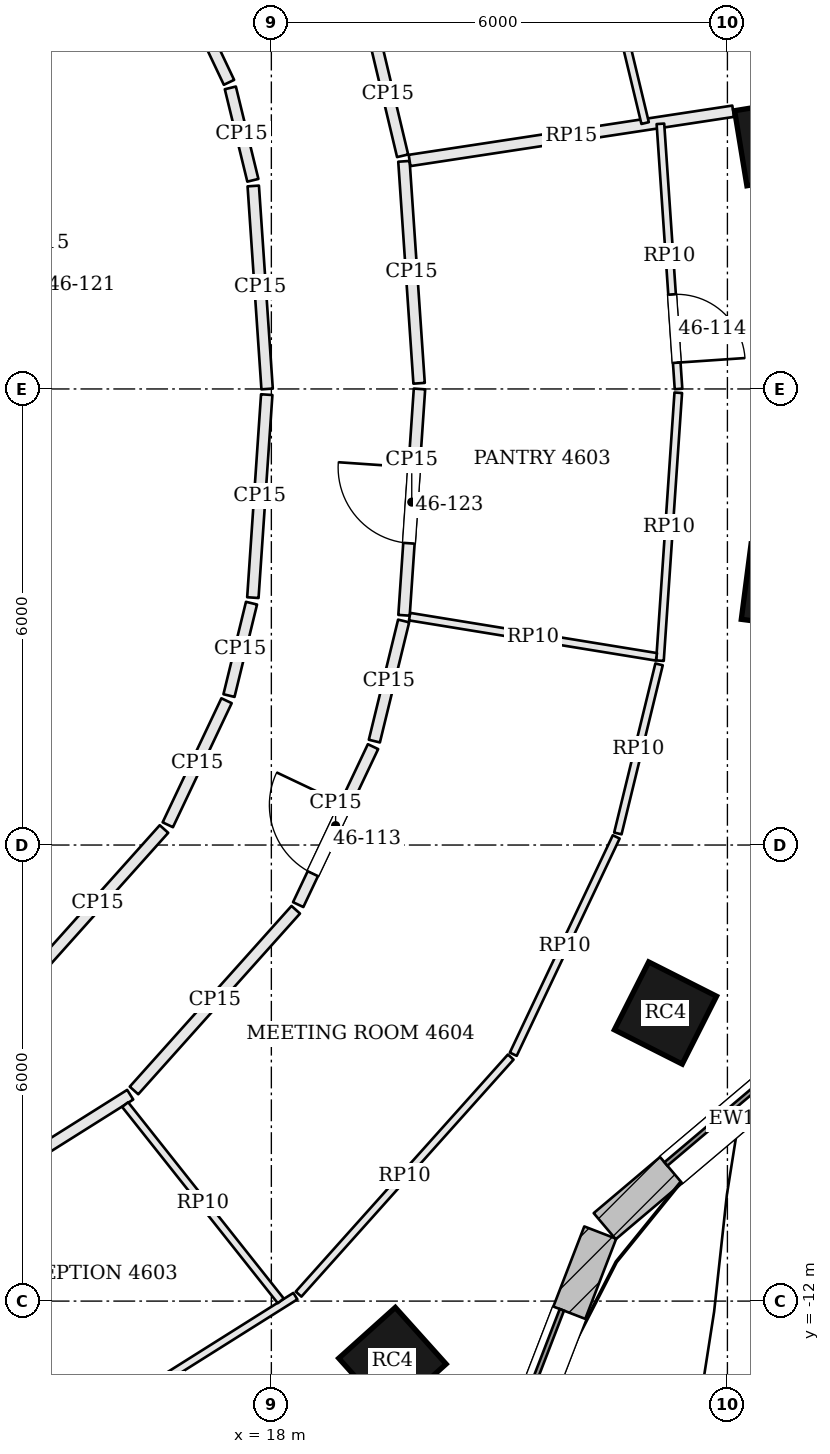
"""IFC4 building model, lengths in metres.
Left out: names, types, materials, properties, quantities, classifications, styles, units other than length and angle.
Written with IfcOpenShell. Run it as: python <this file> out.ifc"""

import sys

from ifc_helpers import new_model, si_unit, direction, frame, frame_2d, origin, origin_2d, place, context, subcontext, project, spatial, rectangle, extrude, element, fill, save


model = new_model("IFC4")
c1 = context("Model", 3, precision=1e-05, world=origin(), true_north=direction((0.0, 1.0)))
c2 = subcontext(c1, "Body", "Model", "MODEL_VIEW")
j1 = project(units=[si_unit("LENGTHUNIT", "METRE"), si_unit("PLANEANGLEUNIT", "RADIAN")], contexts=[c1])
p1 = place(None, origin())
s1 = spatial("IfcSite", under=j1, at=p1, CompositionType="ELEMENT")
p2 = place(p1, origin())
s2 = spatial("IfcBuilding", under=s1, at=p2, CompositionType="ELEMENT")
p3 = place(p2, frame((0.0, 0.0, 189.6)))
s3 = spatial("IfcBuildingStorey", under=s2, at=p3, CompositionType="ELEMENT", Elevation=189.6)
for number, where, z_axis, x_axis in (
    (1, (24.669, 3.248, 0.0), (0.0, 0.0, 1.0), (-0.162, 0.987, 0.0)),
    (2, (19.593, -12.79, 0.0), (0.0, 0.0, 1.0), (0.744, 0.668, 0.0)),
    (3, (23.185, -8.21, 0.0), (0.0, 0.0, 1.0), (0.451, 0.893, 0.0)),
    (4, (24.743, -2.599, 0.0), (0.0, 0.0, 1.0), (0.128, 0.992, 0.0)),
):
    element("IfcColumn", number, at=place(p3, frame(where, z_axis=z_axis, x_axis=x_axis)), inside=s3, PredefinedType="COLUMN", context=c2, shape_type="SweptSolid", body=[
        extrude(rectangle(XDim=1.0, YDim=1.0, at=origin_2d()), origin(), (0.0, 0.0, 1.0), 3.9),
    ])
p4 = place(p3, frame((20.757, -15.166, 0.0), z_axis=(0.0, 0.0, 1.0), x_axis=(0.360067043581, 0.932926430179, 0.0)))
e5 = element("IfcWall", 5, at=p4, inside=s3, PredefinedType="SOLIDWALL", context=c2, shape_type="SweptSolid", body=[
    extrude(rectangle(XDim=4.36, YDim=0.45, at=frame_2d((2.18, 0.0))), origin(), (0.0, 0.0, 1.0), 3.7),
])
p5 = place(p4, frame((1.13, 0.0, 0.9)))
e6 = element("IfcOpeningElement", 6, at=p5, cuts=e5, PredefinedType="OPENING", context=c2, shape_type="SweptSolid", body=[
    extrude(rectangle(XDim=2.1, YDim=2.3, at=frame_2d((1.05, 1.15))), frame((0.0, 0.235, 0.0), z_axis=(0.0, -1.0, 0.0), x_axis=(1.0, 0.0, 0.0)), (0.0, 0.0, 1.0), 0.47),
])
p6 = place(p3, frame((22.386, -11.014, 0.0), z_axis=(0.0, 0.0, 1.0), x_axis=(0.763569952162, 0.645725118108, 0.0)))
e7 = element("IfcWall", 7, at=p6, inside=s3, PredefinedType="SOLIDWALL", context=c2, shape_type="SweptSolid", body=[
    extrude(rectangle(XDim=4.386, YDim=0.45, at=frame_2d((2.193, 0.0))), origin(), (0.0, 0.0, 1.0), 3.7),
])
p7 = place(p6, frame((1.143, 0.0, 0.9)))
e8 = element("IfcOpeningElement", 8, at=p7, cuts=e7, PredefinedType="OPENING", context=c2, shape_type="SweptSolid", body=[
    extrude(rectangle(XDim=2.1, YDim=2.3, at=frame_2d((1.05, 1.15))), frame((0.0, 0.235, 0.0), z_axis=(0.0, -1.0, 0.0), x_axis=(1.0, 0.0, 0.0)), (0.0, 0.0, 1.0), 0.47),
])
p8 = place(p3, frame((13.197, -11.139, 0.0), z_axis=(0.0, 0.0, 1.0), x_axis=(0.846390903833, 0.532562144644, 0.0)))
e9 = element("IfcWall", 9, at=p8, inside=s3, PredefinedType="PARTITIONING", context=c2, shape_type="SweptSolid", body=[
    extrude(rectangle(XDim=3.481, YDim=0.15, at=frame_2d((1.741, 0.0))), origin(), (0.0, 0.0, 1.0), 3.084),
])
p9 = place(p3, frame((16.193, -9.229, 0.0), z_axis=(0.0, 0.0, 1.0), x_axis=(0.666882089048, 0.745163256815, 0.0)))
e10 = element("IfcWall", 10, at=p9, inside=s3, PredefinedType="PARTITIONING", context=c2, shape_type="SweptSolid", body=[
    extrude(rectangle(XDim=3.19, YDim=0.15, at=frame_2d((1.595, 0.0))), origin(), (0.0, 0.0, 1.0), 3.084),
])
p10 = place(p3, frame((18.353, -6.784, 0.0), z_axis=(0.0, 0.0, 1.0), x_axis=(0.428086344739, 0.903737838894, 0.0)))
e11 = element("IfcWall", 11, at=p10, inside=s3, PredefinedType="PARTITIONING", context=c2, shape_type="SweptSolid", body=[
    extrude(rectangle(XDim=2.3, YDim=0.15, at=frame_2d((1.15, 0.0))), origin(), (0.0, 0.0, 1.0), 3.084),
])
p11 = place(p10, frame((0.45, 0.0, 0.0)))
e12 = element("IfcOpeningElement", 12, at=p11, cuts=e11, PredefinedType="OPENING", context=c2, shape_type="SweptSolid", body=[
    extrude(rectangle(XDim=1.0, YDim=2.4, at=frame_2d((0.5, 1.2))), frame((0.0, 0.085, 0.0), z_axis=(0.0, -1.0, 0.0), x_axis=(1.0, 0.0, 0.0)), (0.0, 0.0, 1.0), 0.17),
])
p12 = place(p3, frame((19.355, -4.633, 0.0), z_axis=(0.0, 0.0, 1.0), x_axis=(0.236703930685, 0.971581828359, 0.0)))
e13 = element("IfcWall", 13, at=p12, inside=s3, PredefinedType="PARTITIONING", context=c2, shape_type="SweptSolid", body=[
    extrude(rectangle(XDim=1.626, YDim=0.15, at=frame_2d((0.813, 0.0))), origin(), (0.0, 0.0, 1.0), 3.084),
])
p13 = place(p3, frame((19.745, -2.978, 0.0), z_axis=(0.0, 0.0, 1.0), x_axis=(0.068142324, 0.997675610447, 0.0)))
e14 = element("IfcWall", 14, at=p13, inside=s3, PredefinedType="PARTITIONING", context=c2, shape_type="SweptSolid", body=[
    extrude(rectangle(XDim=2.984, YDim=0.15, at=frame_2d((1.492, 0.0))), origin(), (0.0, 0.0, 1.0), 3.084),
])
p14 = place(p13, frame((0.95, 0.0, 0.0)))
e15 = element("IfcOpeningElement", 15, at=p14, cuts=e14, PredefinedType="OPENING", context=c2, shape_type="SweptSolid", body=[
    extrude(rectangle(XDim=1.0, YDim=2.1, at=frame_2d((0.5, 1.05))), frame((0.0, 0.085, 0.0), z_axis=(0.0, -1.0, 0.0), x_axis=(1.0, 0.0, 0.0)), (0.0, 0.0, 1.0), 0.17),
])
p15 = place(p3, frame((19.944, 0.075, 0.0), z_axis=(0.0, 0.0, 1.0), x_axis=(-0.068069178311, 0.997680603682, 0.0)))
e16 = element("IfcWall", 16, at=p15, inside=s3, PredefinedType="PARTITIONING", context=c2, shape_type="SweptSolid", body=[
    extrude(rectangle(XDim=2.927, YDim=0.15, at=frame_2d((1.463, 0.0))), origin(), (0.0, 0.0, 1.0), 3.084),
])
p16 = place(p3, frame((24.076, 3.654, 0.0), z_axis=(0.0, 0.0, 1.0), x_axis=(-0.988615537638, -0.150463679143, 0.0)))
e17 = element("IfcWall", 17, at=p16, inside=s3, PredefinedType="PARTITIONING", context=c2, shape_type="SweptSolid", body=[
    extrude(rectangle(XDim=4.306, YDim=0.15, at=frame_2d((2.153, 0.0))), origin(), (0.0, 0.0, 1.0), 3.184),
])
p17 = place(p3, frame((19.727, 3.068, 0.0), z_axis=(0.0, 0.0, 1.0), x_axis=(-0.231293770986, 0.972883955826, 0.0)))
e18 = element("IfcWall", 18, at=p17, inside=s3, PredefinedType="PARTITIONING", context=c2, shape_type="SweptSolid", body=[
    extrude(rectangle(XDim=1.684, YDim=0.15, at=frame_2d((0.842, 0.0))), origin(), (0.0, 0.0, 1.0), 3.084),
])
p18 = place(p3, frame((16.652, 5.702, 0.0), z_axis=(0.0, 0.0, 1.0), x_axis=(0.428126129773, -0.903718992279, 0.0)))
e19 = element("IfcWall", 19, at=p18, inside=s3, PredefinedType="PARTITIONING", context=c2, shape_type="SweptSolid", body=[
    extrude(rectangle(XDim=1.846, YDim=0.15, at=frame_2d((0.923, 0.0))), origin(), (0.0, 0.0, 1.0), 3.084),
])
p19 = place(p3, frame((17.46, 3.961, 0.0), z_axis=(0.0, 0.0, 1.0), x_axis=(0.236655249498, -0.971593687137, 0.0)))
e20 = element("IfcWall", 20, at=p19, inside=s3, PredefinedType="PARTITIONING", context=c2, shape_type="SweptSolid", body=[
    extrude(rectangle(XDim=1.251, YDim=0.15, at=frame_2d((0.626, 0.0))), origin(), (0.0, 0.0, 1.0), 3.084),
])
p20 = place(p3, frame((17.762, 2.67, 0.0), z_axis=(0.0, 0.0, 1.0), x_axis=(0.068135311644, -0.997676089373, 0.0)))
e21 = element("IfcWall", 21, at=p20, inside=s3, PredefinedType="PARTITIONING", context=c2, shape_type="SweptSolid", body=[
    extrude(rectangle(XDim=2.677, YDim=0.15, at=frame_2d((1.338, 0.0))), origin(), (0.0, 0.0, 1.0), 3.084),
])
p21 = place(p3, frame((17.939, -0.075, 0.0), z_axis=(0.0, 0.0, 1.0), x_axis=(-0.068226099283, -0.99766988497, 0.0)))
e22 = element("IfcWall", 22, at=p21, inside=s3, PredefinedType="PARTITIONING", context=c2, shape_type="SweptSolid", body=[
    extrude(rectangle(XDim=2.677, YDim=0.15, at=frame_2d((1.338, 0.0))), origin(), (0.0, 0.0, 1.0), 3.084),
])
p22 = place(p3, frame((17.739, -2.818, 0.0), z_axis=(0.0, 0.0, 1.0), x_axis=(-0.236884307907, -0.971537865792, 0.0)))
e23 = element("IfcWall", 23, at=p22, inside=s3, PredefinedType="PARTITIONING", context=c2, shape_type="SweptSolid", body=[
    extrude(rectangle(XDim=1.251, YDim=0.15, at=frame_2d((0.625, 0.0))), origin(), (0.0, 0.0, 1.0), 3.084),
])
p23 = place(p3, frame((17.41, -4.102, 0.0), z_axis=(0.0, 0.0, 1.0), x_axis=(-0.428074720318, -0.903743345107, 0.0)))
e24 = element("IfcWall", 24, at=p23, inside=s3, PredefinedType="PARTITIONING", context=c2, shape_type="SweptSolid", body=[
    extrude(rectangle(XDim=1.806, YDim=0.15, at=frame_2d((0.903, 0.0))), origin(), (0.0, 0.0, 1.0), 3.084),
])
p24 = place(p3, frame((16.587, -5.789, 0.0), z_axis=(0.0, 0.0, 1.0), x_axis=(-0.666887460656, -0.745158449472, 0.0)))
e25 = element("IfcWall", 25, at=p24, inside=s3, PredefinedType="PARTITIONING", context=c2, shape_type="SweptSolid", body=[
    extrude(rectangle(XDim=2.62, YDim=0.15, at=frame_2d((1.31, 0.0))), origin(), (0.0, 0.0, 1.0), 3.084),
])
p25 = place(p3, frame((23.118, 3.488, 0.0), z_axis=(0.0, 0.0, 1.0), x_axis=(0.068155004578, -0.997674744268, 0.0)))
e26 = element("IfcWall", 26, at=p25, inside=s3, PredefinedType="PARTITIONING", context=c2, shape_type="SweptSolid", body=[
    extrude(rectangle(XDim=3.496, YDim=0.1, at=frame_2d((1.748, 0.0))), origin(), (0.0, 0.0, 1.0), 3.084),
])
p26 = place(p25, frame((2.25, 0.0, 0.0)))
e27 = element("IfcOpeningElement", 27, at=p26, cuts=e26, PredefinedType="OPENING", context=c2, shape_type="SweptSolid", body=[
    extrude(rectangle(XDim=0.9, YDim=2.1, at=frame_2d((0.45, 1.05))), frame((0.0, 0.06, 0.0), z_axis=(0.0, -1.0, 0.0), x_axis=(1.0, 0.0, 0.0)), (0.0, 0.0, 1.0), 0.12),
])
p27 = place(p3, frame((23.354, -0.05, 0.0), z_axis=(0.0, 0.0, 1.0), x_axis=(-0.06820679361, -0.99767120501, 0.0)))
e28 = element("IfcWall", 28, at=p27, inside=s3, PredefinedType="PARTITIONING", context=c2, shape_type="SweptSolid", body=[
    extrude(rectangle(XDim=3.533, YDim=0.1, at=frame_2d((1.767, 0.0))), origin(), (0.0, 0.0, 1.0), 3.084),
])
p28 = place(p3, frame((23.101, -3.623, 0.0), z_axis=(0.0, 0.0, 1.0), x_axis=(-0.236811358433, -0.971555649727, 0.0)))
e29 = element("IfcWall", 29, at=p28, inside=s3, PredefinedType="PARTITIONING", context=c2, shape_type="SweptSolid", body=[
    extrude(rectangle(XDim=2.29, YDim=0.1, at=frame_2d((1.145, 0.0))), origin(), (0.0, 0.0, 1.0), 3.084),
])
p29 = place(p3, frame((22.537, -5.893, 0.0), z_axis=(0.0, 0.0, 1.0), x_axis=(-0.428099612517, -0.903731554037, 0.0)))
e30 = element("IfcWall", 30, at=p29, inside=s3, PredefinedType="PARTITIONING", context=c2, shape_type="SweptSolid", body=[
    extrude(rectangle(XDim=3.164, YDim=0.1, at=frame_2d((1.582, 0.0))), origin(), (0.0, 0.0, 1.0), 3.084),
])
p30 = place(p3, frame((21.149, -8.789, 0.0), z_axis=(0.0, 0.0, 1.0), x_axis=(-0.666915902537, -0.745132994132, 0.0)))
e31 = element("IfcWall", 31, at=p30, inside=s3, PredefinedType="PARTITIONING", context=c2, shape_type="SweptSolid", body=[
    extrude(rectangle(XDim=4.186, YDim=0.1, at=frame_2d((2.093, 0.0))), origin(), (0.0, 0.0, 1.0), 3.084),
])
p31 = place(p3, frame((18.316, -11.935, 0.0), z_axis=(0.0, 0.0, 1.0), x_axis=(-0.84637539713, -0.532586788358, 0.0)))
e32 = element("IfcWall", 32, at=p31, inside=s3, PredefinedType="PARTITIONING", context=c2, shape_type="SweptSolid", body=[
    extrude(rectangle(XDim=4.346, YDim=0.1, at=frame_2d((2.173, 0.0))), origin(), (0.0, 0.0, 1.0), 3.084),
])
p32 = place(p3, frame((16.076, -9.415, 0.0), z_axis=(0.0, 0.0, 1.0), x_axis=(0.621346089483, -0.783536238526, 0.0)))
e33 = element("IfcWall", 33, at=p32, inside=s3, PredefinedType="PARTITIONING", context=c2, shape_type="SweptSolid", body=[
    extrude(rectangle(XDim=3.295, YDim=0.1, at=frame_2d((1.647, 0.0))), origin(), (0.0, 0.0, 1.0), 3.084),
])
p33 = place(p3, frame((19.819, -2.995, 0.0), z_axis=(0.0, 0.0, 1.0), x_axis=(0.987008638383, -0.160667195647, 0.0)))
e34 = element("IfcWall", 34, at=p33, inside=s3, PredefinedType="PARTITIONING", context=c2, shape_type="SweptSolid", body=[
    extrude(rectangle(XDim=3.29, YDim=0.1, at=frame_2d((1.645, 0.0))), origin(), (0.0, 0.0, 1.0), 3.084),
])
p34 = place(p3, frame((22.381, 5.732, 0.0), z_axis=(0.0, 0.0, 1.0), x_axis=(0.233473432697, -0.972363181237, 0.0)))
e35 = element("IfcWall", 35, at=p34, inside=s3, PredefinedType="PARTITIONING", context=c2, shape_type="SweptSolid", body=[
    extrude(rectangle(XDim=2.297, YDim=0.1, at=frame_2d((1.149, 0.0))), origin(), (0.0, 0.0, 1.0), 3.084),
])
p35 = place(p5, origin())
e36 = element("IfcWindow", 36, at=p35, inside=s3, PartitioningType="SINGLE_PANEL", PredefinedType="WINDOW", context=c2, shape_type="SweptSolid", body=[
    extrude(rectangle(XDim=2.1, YDim=2.3, at=frame_2d((1.05, 1.15))), frame((0.0, 0.135, 0.0), z_axis=(0.0, -1.0, 0.0), x_axis=(1.0, 0.0, 0.0)), (0.0, 0.0, 1.0), 0.06),
])
fill(e6, e36)
p36 = place(p7, origin())
e37 = element("IfcWindow", 37, at=p36, inside=s3, PartitioningType="SINGLE_PANEL", PredefinedType="WINDOW", context=c2, shape_type="SweptSolid", body=[
    extrude(rectangle(XDim=2.1, YDim=2.3, at=frame_2d((1.05, 1.15))), frame((0.0, 0.135, 0.0), z_axis=(0.0, -1.0, 0.0), x_axis=(1.0, 0.0, 0.0)), (0.0, 0.0, 1.0), 0.06),
])
fill(e8, e37)
p37 = place(p11, origin())
e38 = element("IfcDoor", 38, at=p37, inside=s3, OperationType="SINGLE_SWING_RIGHT", PredefinedType="DOOR", context=c2, shape_type="SweptSolid", body=[
    extrude(rectangle(XDim=1.0, YDim=2.4, at=frame_2d((0.5, 1.2))), frame((0.0, 0.025, 0.0), z_axis=(0.0, -1.0, 0.0), x_axis=(1.0, 0.0, 0.0)), (0.0, 0.0, 1.0), 0.05),
])
fill(e12, e38)
p38 = place(p26, origin())
e39 = element("IfcDoor", 39, at=p38, inside=s3, OperationType="SINGLE_SWING_RIGHT", PredefinedType="DOOR", context=c2, shape_type="SweptSolid", body=[
    extrude(rectangle(XDim=0.9, YDim=2.1, at=frame_2d((0.45, 1.05))), frame((0.0, 0.025, 0.0), z_axis=(0.0, -1.0, 0.0), x_axis=(1.0, 0.0, 0.0)), (0.0, 0.0, 1.0), 0.05),
])
fill(e27, e39)
p39 = place(p14, origin())
e40 = element("IfcDoor", 40, at=p39, inside=s3, OperationType="SINGLE_SWING_RIGHT", PredefinedType="DOOR", context=c2, shape_type="SweptSolid", body=[
    extrude(rectangle(XDim=1.0, YDim=2.1, at=frame_2d((0.5, 1.05))), frame((0.0, 0.025, 0.0), z_axis=(0.0, -1.0, 0.0), x_axis=(1.0, 0.0, 0.0)), (0.0, 0.0, 1.0), 0.05),
])
fill(e15, e40)
save(model, sys.argv[1])
